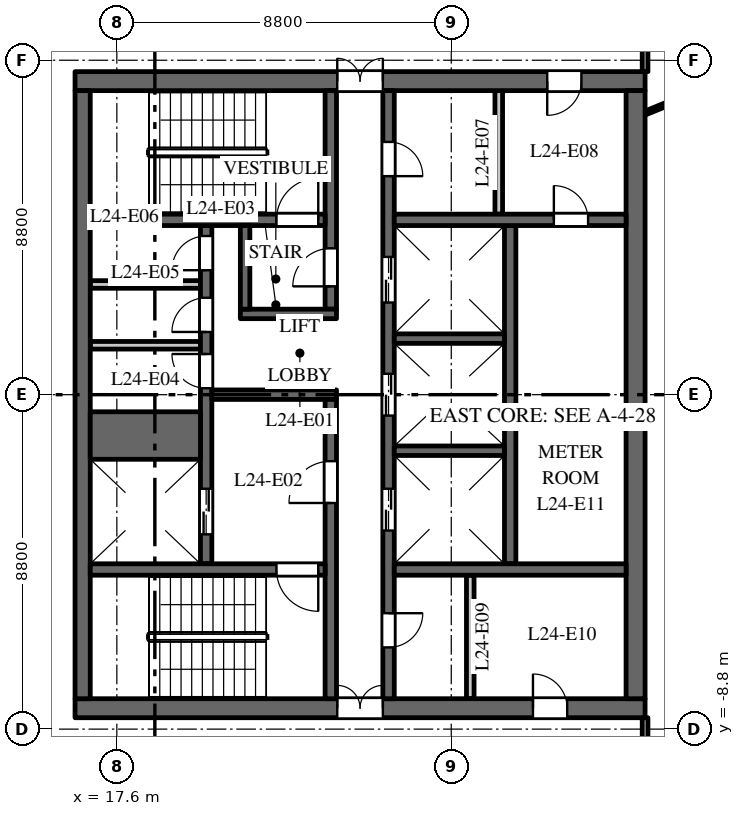
"""IFC4 building model, lengths in metres.
Left out: names, types, materials, properties, quantities, classifications, styles, units other than length and angle.
Written with IfcOpenShell. Run it as: python <this file> out.ifc"""

import sys

from ifc_helpers import new_model, si_unit, direction, frame, frame_2d, origin, place, context, subcontext, project, spatial, rectangle, extrude, element, fill, save


model = new_model("IFC4")
c1 = context("Model", 3, precision=1e-05, world=origin(), true_north=direction((0.0, 1.0)))
c2 = subcontext(c1, "Body", "Model", "MODEL_VIEW")
j1 = project(units=[si_unit("LENGTHUNIT", "METRE"), si_unit("PLANEANGLEUNIT", "RADIAN")], contexts=[c1])
p1 = place(None, origin())
s1 = spatial("IfcSite", under=j1, at=p1, CompositionType="ELEMENT")
p2 = place(p1, origin())
s2 = spatial("IfcBuilding", under=s1, at=p2, CompositionType="ELEMENT")
p3 = place(p2, frame((0.0, 0.0, 108.0)))
s3 = spatial("IfcBuildingStorey", under=s2, at=p3, CompositionType="ELEMENT", Elevation=108.0)
p4 = place(p3, frame((16.5, 8.25, 0.0), z_axis=(0.0, 0.0, 1.0), x_axis=(1.0, 0.0, 0.0)))
e1 = element("IfcWall", 1, at=p4, inside=s3, PredefinedType="SHEAR", context=c2, shape_type="SweptSolid", body=[
    extrude(rectangle(XDim=15.0, YDim=0.5, at=frame_2d((7.5, 0.0))), origin(), (0.0, 0.0, 1.0), 3.7),
])
p5 = place(p4, frame((6.9, 0.0, 0.0)))
e2 = element("IfcOpeningElement", 2, at=p5, cuts=e1, PredefinedType="OPENING", context=c2, shape_type="SweptSolid", body=[
    extrude(rectangle(XDim=1.2, YDim=2.1, at=frame_2d((0.6, 1.05))), frame((0.0, 0.26, 0.0), z_axis=(0.0, -1.0, 0.0), x_axis=(1.0, 0.0, 0.0)), (0.0, 0.0, 1.0), 0.52),
])
p6 = place(p4, frame((12.425, 0.0, 0.0)))
e3 = element("IfcOpeningElement", 3, at=p6, cuts=e1, PredefinedType="OPENING", context=c2, shape_type="SweptSolid", body=[
    extrude(rectangle(XDim=0.9, YDim=2.1, at=frame_2d((0.45, 1.05))), frame((0.0, 0.26, 0.0), z_axis=(0.0, -1.0, 0.0), x_axis=(1.0, 0.0, 0.0)), (0.0, 0.0, 1.0), 0.52),
])
p7 = place(p3, frame((16.5, -8.25, 0.0), z_axis=(0.0, 0.0, 1.0), x_axis=(1.0, 0.0, 0.0)))
e4 = element("IfcWall", 4, at=p7, inside=s3, PredefinedType="SHEAR", context=c2, shape_type="SweptSolid", body=[
    extrude(rectangle(XDim=15.0, YDim=0.5, at=frame_2d((7.5, 0.0))), origin(), (0.0, 0.0, 1.0), 3.7),
])
p8 = place(p7, frame((6.9, 0.0, 0.0)))
e5 = element("IfcOpeningElement", 5, at=p8, cuts=e4, PredefinedType="OPENING", context=c2, shape_type="SweptSolid", body=[
    extrude(rectangle(XDim=1.2, YDim=2.1, at=frame_2d((0.6, 1.05))), frame((0.0, 0.26, 0.0), z_axis=(0.0, -1.0, 0.0), x_axis=(1.0, 0.0, 0.0)), (0.0, 0.0, 1.0), 0.52),
])
p9 = place(p7, frame((12.05, 0.0, 0.0)))
e6 = element("IfcOpeningElement", 6, at=p9, cuts=e4, PredefinedType="OPENING", context=c2, shape_type="SweptSolid", body=[
    extrude(rectangle(XDim=0.9, YDim=2.1, at=frame_2d((0.45, 1.05))), frame((0.0, 0.26, 0.0), z_axis=(0.0, -1.0, 0.0), x_axis=(1.0, 0.0, 0.0)), (0.0, 0.0, 1.0), 0.52),
])
for number, where, z_axis, x_axis in (
    (7, (16.9, 1.3, 0.0), (0.0, 0.0, 1.0), (1.0, 0.0, 0.0)),
    (8, (16.9, 2.9, 0.0), (0.0, 0.0, 1.0), (1.0, 0.0, 0.0)),
):
    element("IfcWall", number, at=place(p3, frame(where, z_axis=z_axis, x_axis=x_axis)), inside=s3, PredefinedType="PARTITIONING", context=c2, shape_type="SweptSolid", body=[
        extrude(rectangle(XDim=2.9, YDim=0.2, at=frame_2d((1.45, 0.0))), origin(), (0.0, 0.0, 1.0), 3.7),
    ])
p10 = place(p3, frame((27.95, -4.45, 0.0), z_axis=(0.0, 0.0, 1.0), x_axis=(0.0, 1.0, 0.0)))
e9 = element("IfcWall", 9, at=p10, inside=s3, PredefinedType="SHEAR", context=c2, shape_type="SweptSolid", body=[
    extrude(rectangle(XDim=8.9, YDim=0.3, at=frame_2d((4.45, 0.0))), origin(), (0.0, 0.0, 1.0), 3.7),
])
p11 = place(p3, frame((19.95, -4.45, 0.0), z_axis=(0.0, 0.0, 1.0), x_axis=(0.0, 1.0, 0.0)))
e10 = element("IfcWall", 10, at=p11, inside=s3, PredefinedType="SHEAR", context=c2, shape_type="SweptSolid", body=[
    extrude(rectangle(XDim=8.9, YDim=0.3, at=frame_2d((4.45, 0.0))), origin(), (0.0, 0.0, 1.0), 3.7),
])
p12 = place(p11, frame((0.775, 0.0, 0.0)))
e11 = element("IfcOpeningElement", 11, at=p12, cuts=e10, PredefinedType="OPENING", context=c2, shape_type="SweptSolid", body=[
    extrude(rectangle(XDim=1.2, YDim=2.1, at=frame_2d((0.6, 1.05))), frame((0.0, 0.16, 0.0), z_axis=(0.0, -1.0, 0.0), x_axis=(1.0, 0.0, 0.0)), (0.0, 0.0, 1.0), 0.32),
])
p13 = place(p11, frame((4.62, 0.0, 0.0)))
e12 = element("IfcOpeningElement", 12, at=p13, cuts=e10, PredefinedType="OPENING", context=c2, shape_type="SweptSolid", body=[
    extrude(rectangle(XDim=0.9, YDim=2.1, at=frame_2d((0.45, 1.05))), frame((0.0, 0.16, 0.0), z_axis=(0.0, -1.0, 0.0), x_axis=(1.0, 0.0, 0.0)), (0.0, 0.0, 1.0), 0.32),
])
p14 = place(p11, frame((6.1, 0.0, 0.0)))
e13 = element("IfcOpeningElement", 13, at=p14, cuts=e10, PredefinedType="OPENING", context=c2, shape_type="SweptSolid", body=[
    extrude(rectangle(XDim=0.9, YDim=2.1, at=frame_2d((0.45, 1.05))), frame((0.0, 0.16, 0.0), z_axis=(0.0, -1.0, 0.0), x_axis=(1.0, 0.0, 0.0)), (0.0, 0.0, 1.0), 0.32),
])
p15 = place(p11, frame((7.725, 0.0, 0.0)))
e14 = element("IfcOpeningElement", 14, at=p15, cuts=e10, PredefinedType="OPENING", context=c2, shape_type="SweptSolid", body=[
    extrude(rectangle(XDim=0.9, YDim=2.1, at=frame_2d((0.45, 1.05))), frame((0.0, 0.16, 0.0), z_axis=(0.0, -1.0, 0.0), x_axis=(1.0, 0.0, 0.0)), (0.0, 0.0, 1.0), 0.32),
])
p16 = place(p3, frame((24.75, -8.0, 0.0), z_axis=(0.0, 0.0, 1.0), x_axis=(0.0, 1.0, 0.0)))
e15 = element("IfcWall", 15, at=p16, inside=s3, PredefinedType="SHEAR", context=c2, shape_type="SweptSolid", body=[
    extrude(rectangle(XDim=16.0, YDim=0.3, at=frame_2d((8.0, 0.0))), origin(), (0.0, 0.0, 1.0), 3.7),
])
p17 = place(p16, frame((4.425, 0.0, 0.0)))
e16 = element("IfcOpeningElement", 16, at=p17, cuts=e15, PredefinedType="OPENING", context=c2, shape_type="SweptSolid", body=[
    extrude(rectangle(XDim=1.1, YDim=2.1, at=frame_2d((0.55, 1.05))), frame((0.0, 0.16, 0.0), z_axis=(0.0, -1.0, 0.0), x_axis=(1.0, 0.0, 0.0)), (0.0, 0.0, 1.0), 0.32),
])
p18 = place(p16, frame((7.45, 0.0, 0.0)))
e17 = element("IfcOpeningElement", 17, at=p18, cuts=e15, PredefinedType="OPENING", context=c2, shape_type="SweptSolid", body=[
    extrude(rectangle(XDim=1.1, YDim=2.1, at=frame_2d((0.55, 1.05))), frame((0.0, 0.16, 0.0), z_axis=(0.0, -1.0, 0.0), x_axis=(1.0, 0.0, 0.0)), (0.0, 0.0, 1.0), 0.32),
])
p19 = place(p16, frame((10.425, 0.0, 0.0)))
e18 = element("IfcOpeningElement", 18, at=p19, cuts=e15, PredefinedType="OPENING", context=c2, shape_type="SweptSolid", body=[
    extrude(rectangle(XDim=1.2, YDim=2.1, at=frame_2d((0.6, 1.05))), frame((0.0, 0.16, 0.0), z_axis=(0.0, -1.0, 0.0), x_axis=(1.0, 0.0, 0.0)), (0.0, 0.0, 1.0), 0.32),
])
p20 = place(p16, frame((13.75, 0.0, 0.0)))
e19 = element("IfcOpeningElement", 19, at=p20, cuts=e15, PredefinedType="OPENING", context=c2, shape_type="SweptSolid", body=[
    extrude(rectangle(XDim=0.9, YDim=2.1, at=frame_2d((0.45, 1.05))), frame((0.0, 0.16, 0.0), z_axis=(0.0, -1.0, 0.0), x_axis=(1.0, 0.0, 0.0)), (0.0, 0.0, 1.0), 0.32),
])
p21 = place(p16, frame((1.35, 0.0, 0.0)))
e20 = element("IfcOpeningElement", 20, at=p21, cuts=e15, PredefinedType="OPENING", context=c2, shape_type="SweptSolid", body=[
    extrude(rectangle(XDim=0.9, YDim=2.1, at=frame_2d((0.45, 1.05))), frame((0.0, 0.16, 0.0), z_axis=(0.0, -1.0, 0.0), x_axis=(1.0, 0.0, 0.0)), (0.0, 0.0, 1.0), 0.32),
])
p22 = place(p3, frame((20.1, 0.0, 0.0), z_axis=(0.0, 0.0, 1.0), x_axis=(1.0, 0.0, 0.0)))
e21 = element("IfcWall", 21, at=p22, inside=s3, PredefinedType="SHEAR", context=c2, shape_type="SweptSolid", body=[
    extrude(rectangle(XDim=3.28, YDim=0.25, at=frame_2d((1.64, 0.0))), origin(), (0.0, 0.0, 1.0), 3.7),
])
p23 = place(p3, frame((16.7, -8.0, 0.0), z_axis=(0.0, 0.0, 1.0), x_axis=(0.0, 1.0, 0.0)))
e22 = element("IfcWall", 22, at=p23, inside=s3, PredefinedType="SHEAR", context=c2, shape_type="SweptSolid", body=[
    extrude(rectangle(XDim=16.0, YDim=0.4, at=frame_2d((8.0, 0.0))), origin(), (0.0, 0.0, 1.0), 3.7),
])
p24 = place(p3, frame((31.25, -8.0, 0.0), z_axis=(0.0, 0.0, 1.0), x_axis=(0.0, 1.0, 0.0)))
e23 = element("IfcWall", 23, at=p24, inside=s3, PredefinedType="SHEAR", context=c2, shape_type="SweptSolid", body=[
    extrude(rectangle(XDim=16.0, YDim=0.5, at=frame_2d((8.0, 0.0))), origin(), (0.0, 0.0, 1.0), 3.7),
])
p25 = place(p3, frame((24.9, 4.6, 0.0), z_axis=(0.0, 0.0, 1.0), x_axis=(1.0, 0.0, 0.0)))
e24 = element("IfcWall", 24, at=p25, inside=s3, PredefinedType="SHEAR", context=c2, shape_type="SweptSolid", body=[
    extrude(rectangle(XDim=6.1, YDim=0.3, at=frame_2d((3.05, 0.0))), origin(), (0.0, 0.0, 1.0), 3.7),
])
p26 = place(p25, frame((4.2, 0.0, 0.0)))
e25 = element("IfcOpeningElement", 25, at=p26, cuts=e24, PredefinedType="OPENING", context=c2, shape_type="SweptSolid", body=[
    extrude(rectangle(XDim=0.9, YDim=2.1, at=frame_2d((0.45, 1.05))), frame((0.0, 0.16, 0.0), z_axis=(0.0, -1.0, 0.0), x_axis=(1.0, 0.0, 0.0)), (0.0, 0.0, 1.0), 0.32),
])
for number, where, z_axis, x_axis in (
    (26, (27.65, 4.75, 0.0), (0.0, 0.0, 1.0), (0.0, 1.0, 0.0)),
    (27, (26.9, -8.0, 0.0), (0.0, 0.0, 1.0), (0.0, 1.0, 0.0)),
):
    element("IfcWall", number, at=place(p3, frame(where, z_axis=z_axis, x_axis=x_axis)), inside=s3, PredefinedType="PARTITIONING", context=c2, shape_type="SweptSolid", body=[
        extrude(rectangle(XDim=3.25, YDim=0.2, at=frame_2d((1.625, 0.0))), origin(), (0.0, 0.0, 1.0), 3.7),
    ])
p27 = place(p3, frame((24.9, -4.6, 0.0), z_axis=(0.0, 0.0, 1.0), x_axis=(1.0, 0.0, 0.0)))
e28 = element("IfcWall", 28, at=p27, inside=s3, PredefinedType="SHEAR", context=c2, shape_type="SweptSolid", body=[
    extrude(rectangle(XDim=6.1, YDim=0.3, at=frame_2d((3.05, 0.0))), origin(), (0.0, 0.0, 1.0), 3.7),
])
p28 = place(p3, frame((16.9, -1.075, 0.0), z_axis=(0.0, 0.0, 1.0), x_axis=(1.0, 0.0, 0.0)))
e29 = element("IfcWall", 29, at=p28, inside=s3, PredefinedType="SHEAR", context=c2, shape_type="SweptSolid", body=[
    extrude(rectangle(XDim=2.9, YDim=1.25, at=frame_2d((1.45, 0.0))), origin(), (0.0, 0.0, 1.0), 3.7),
])
for number, where, z_axis, x_axis in (
    (30, (24.9, -1.475, 0.0), (0.0, 0.0, 1.0), (1.0, 0.0, 0.0)),
    (31, (24.9, 1.475, 0.0), (0.0, 0.0, 1.0), (1.0, 0.0, 0.0)),
):
    element("IfcWall", number, at=place(p3, frame(where, z_axis=z_axis, x_axis=x_axis)), inside=s3, PredefinedType="SHEAR", context=c2, shape_type="SweptSolid", body=[
        extrude(rectangle(XDim=2.9, YDim=0.25, at=frame_2d((1.45, 0.0))), origin(), (0.0, 0.0, 1.0), 3.7),
    ])
p29 = place(p3, frame((23.23, 2.25, 0.0), z_axis=(0.0, 0.0, 1.0), x_axis=(0.0, 1.0, 0.0)))
e32 = element("IfcWall", 32, at=p29, inside=s3, PredefinedType="SHEAR", context=c2, shape_type="SweptSolid", body=[
    extrude(rectangle(XDim=5.75, YDim=0.3, at=frame_2d((2.875, 0.0))), origin(), (0.0, 0.0, 1.0), 3.7),
])
p30 = place(p29, frame((0.6, 0.0, 0.0)))
e33 = element("IfcOpeningElement", 33, at=p30, cuts=e32, PredefinedType="OPENING", context=c2, shape_type="SweptSolid", body=[
    extrude(rectangle(XDim=1.0, YDim=2.1, at=frame_2d((0.5, 1.05))), frame((0.0, 0.16, 0.0), z_axis=(0.0, -1.0, 0.0), x_axis=(1.0, 0.0, 0.0)), (0.0, 0.0, 1.0), 0.32),
])
p31 = place(p3, frame((23.23, -8.0, 0.0), z_axis=(0.0, 0.0, 1.0), x_axis=(0.0, 1.0, 0.0)))
e34 = element("IfcWall", 34, at=p31, inside=s3, PredefinedType="SHEAR", context=c2, shape_type="SweptSolid", body=[
    extrude(rectangle(XDim=7.875, YDim=0.3, at=frame_2d((3.938, 0.0))), origin(), (0.0, 0.0, 1.0), 3.7),
])
p32 = place(p31, frame((5.15, 0.0, 0.0)))
e35 = element("IfcOpeningElement", 35, at=p32, cuts=e34, PredefinedType="OPENING", context=c2, shape_type="SweptSolid", body=[
    extrude(rectangle(XDim=1.1, YDim=2.1, at=frame_2d((0.55, 1.05))), frame((0.0, 0.16, 0.0), z_axis=(0.0, -1.0, 0.0), x_axis=(1.0, 0.0, 0.0)), (0.0, 0.0, 1.0), 0.32),
])
p33 = place(p3, frame((16.9, 4.6, 0.0), z_axis=(0.0, 0.0, 1.0), x_axis=(1.0, 0.0, 0.0)))
e36 = element("IfcWall", 36, at=p33, inside=s3, PredefinedType="SHEAR", context=c2, shape_type="SweptSolid", body=[
    extrude(rectangle(XDim=6.18, YDim=0.3, at=frame_2d((3.09, 0.0))), origin(), (0.0, 0.0, 1.0), 3.7),
])
p34 = place(p33, frame((4.9, 0.0, 0.0)))
e37 = element("IfcOpeningElement", 37, at=p34, cuts=e36, PredefinedType="OPENING", context=c2, shape_type="SweptSolid", body=[
    extrude(rectangle(XDim=1.1, YDim=2.1, at=frame_2d((0.55, 1.05))), frame((0.0, 0.16, 0.0), z_axis=(0.0, -1.0, 0.0), x_axis=(1.0, 0.0, 0.0)), (0.0, 0.0, 1.0), 0.32),
])
p35 = place(p3, frame((16.9, -4.6, 0.0), z_axis=(0.0, 0.0, 1.0), x_axis=(1.0, 0.0, 0.0)))
e38 = element("IfcWall", 38, at=p35, inside=s3, PredefinedType="SHEAR", context=c2, shape_type="SweptSolid", body=[
    extrude(rectangle(XDim=6.18, YDim=0.3, at=frame_2d((3.09, 0.0))), origin(), (0.0, 0.0, 1.0), 3.7),
])
p36 = place(p35, frame((4.9, 0.0, 0.0)))
e39 = element("IfcOpeningElement", 39, at=p36, cuts=e38, PredefinedType="OPENING", context=c2, shape_type="SweptSolid", body=[
    extrude(rectangle(XDim=1.1, YDim=2.1, at=frame_2d((0.55, 1.05))), frame((0.0, 0.16, 0.0), z_axis=(0.0, -1.0, 0.0), x_axis=(1.0, 0.0, 0.0)), (0.0, 0.0, 1.0), 0.32),
])
p37 = place(p3, frame((20.85, 2.125, 0.0), z_axis=(0.0, 0.0, 1.0), x_axis=(1.0, 0.0, 0.0)))
e40 = element("IfcWall", 40, at=p37, inside=s3, PredefinedType="SHEAR", context=c2, shape_type="SweptSolid", body=[
    extrude(rectangle(XDim=2.53, YDim=0.25, at=frame_2d((1.265, 0.0))), origin(), (0.0, 0.0, 1.0), 3.7),
])
p38 = place(p3, frame((20.975, 2.25, 0.0), z_axis=(0.0, 0.0, 1.0), x_axis=(0.0, 1.0, 0.0)))
e41 = element("IfcWall", 41, at=p38, inside=s3, PredefinedType="SHEAR", context=c2, shape_type="SweptSolid", body=[
    extrude(rectangle(XDim=2.2, YDim=0.25, at=frame_2d((1.1, 0.0))), origin(), (0.0, 0.0, 1.0), 3.7),
])
p39 = place(p3, frame((31.5, -10.7, 0.0), z_axis=(0.0, 0.0, 1.0), x_axis=(0.0, 1.0, 0.0)))
e42 = element("IfcWall", 42, at=p39, inside=s3, PredefinedType="PARTITIONING", context=c2, shape_type="SweptSolid", body=[
    extrude(rectangle(XDim=2.2, YDim=0.15, at=frame_2d((1.1, 0.0))), origin(), (0.0, 0.0, 1.0), 2.9),
])
p40 = place(p3, frame((31.5, 7.41, 0.0), z_axis=(0.0, 0.0, 1.0), x_axis=(0.925344112436, 0.379128307542, 0.0)))
e43 = element("IfcWall", 43, at=p40, inside=s3, PredefinedType="PARTITIONING", context=c2, shape_type="SweptSolid", body=[
    extrude(rectangle(XDim=2.954, YDim=0.1, at=frame_2d((1.477, 0.0))), origin(), (0.0, 0.0, 1.0), 3.7),
])
p41 = place(p3, frame((31.5, 8.5, 0.0), z_axis=(0.0, 0.0, 1.0), x_axis=(0.0, 1.0, 0.0)))
e44 = element("IfcWall", 44, at=p41, inside=s3, PredefinedType="PARTITIONING", context=c2, shape_type="SweptSolid", body=[
    extrude(rectangle(XDim=2.2, YDim=0.15, at=frame_2d((1.1, 0.0))), origin(), (0.0, 0.0, 1.0), 2.9),
])
p42 = place(p12, origin())
e45 = element("IfcDoor", 45, at=p42, inside=s3, OperationType="DOUBLE_DOOR_SLIDING", PredefinedType="DOOR", context=c2, shape_type="SweptSolid", body=[
    extrude(rectangle(XDim=1.2, YDim=2.1, at=frame_2d((0.6, 1.05))), frame((0.0, 0.025, 0.0), z_axis=(0.0, -1.0, 0.0), x_axis=(1.0, 0.0, 0.0)), (0.0, 0.0, 1.0), 0.05),
])
fill(e11, e45)
p43 = place(p17, origin())
e46 = element("IfcDoor", 46, at=p43, inside=s3, OperationType="DOUBLE_DOOR_SLIDING", PredefinedType="DOOR", context=c2, shape_type="SweptSolid", body=[
    extrude(rectangle(XDim=1.1, YDim=2.1, at=frame_2d((0.55, 1.05))), frame((0.0, 0.025, 0.0), z_axis=(0.0, -1.0, 0.0), x_axis=(1.0, 0.0, 0.0)), (0.0, 0.0, 1.0), 0.05),
])
fill(e16, e46)
p44 = place(p18, origin())
e47 = element("IfcDoor", 47, at=p44, inside=s3, OperationType="DOUBLE_DOOR_SLIDING", PredefinedType="DOOR", context=c2, shape_type="SweptSolid", body=[
    extrude(rectangle(XDim=1.1, YDim=2.1, at=frame_2d((0.55, 1.05))), frame((0.0, 0.025, 0.0), z_axis=(0.0, -1.0, 0.0), x_axis=(1.0, 0.0, 0.0)), (0.0, 0.0, 1.0), 0.05),
])
fill(e17, e47)
p45 = place(p19, origin())
e48 = element("IfcDoor", 48, at=p45, inside=s3, OperationType="DOUBLE_DOOR_SLIDING", PredefinedType="DOOR", context=c2, shape_type="SweptSolid", body=[
    extrude(rectangle(XDim=1.2, YDim=2.1, at=frame_2d((0.6, 1.05))), frame((0.0, 0.025, 0.0), z_axis=(0.0, -1.0, 0.0), x_axis=(1.0, 0.0, 0.0)), (0.0, 0.0, 1.0), 0.05),
])
fill(e18, e48)
p46 = place(p34, origin())
e49 = element("IfcDoor", 49, at=p46, inside=s3, OperationType="SINGLE_SWING_LEFT", PredefinedType="DOOR", context=c2, shape_type="SweptSolid", body=[
    extrude(rectangle(XDim=1.1, YDim=2.1, at=frame_2d((0.55, 1.05))), frame((0.0, 0.025, 0.0), z_axis=(0.0, -1.0, 0.0), x_axis=(1.0, 0.0, 0.0)), (0.0, 0.0, 1.0), 0.05),
])
fill(e37, e49)
p47 = place(p36, origin())
e50 = element("IfcDoor", 50, at=p47, inside=s3, OperationType="SINGLE_SWING_RIGHT", PredefinedType="DOOR", context=c2, shape_type="SweptSolid", body=[
    extrude(rectangle(XDim=1.1, YDim=2.1, at=frame_2d((0.55, 1.05))), frame((0.0, 0.025, 0.0), z_axis=(0.0, -1.0, 0.0), x_axis=(1.0, 0.0, 0.0)), (0.0, 0.0, 1.0), 0.05),
])
fill(e39, e50)
p48 = place(p32, origin())
e51 = element("IfcDoor", 51, at=p48, inside=s3, OperationType="SINGLE_SWING_RIGHT", PredefinedType="DOOR", context=c2, shape_type="SweptSolid", body=[
    extrude(rectangle(XDim=1.1, YDim=2.1, at=frame_2d((0.55, 1.05))), frame((0.0, 0.025, 0.0), z_axis=(0.0, -1.0, 0.0), x_axis=(1.0, 0.0, 0.0)), (0.0, 0.0, 1.0), 0.05),
])
fill(e35, e51)
p49 = place(p30, origin())
e52 = element("IfcDoor", 52, at=p49, inside=s3, OperationType="SINGLE_SWING_RIGHT", PredefinedType="DOOR", context=c2, shape_type="SweptSolid", body=[
    extrude(rectangle(XDim=1.0, YDim=2.1, at=frame_2d((0.5, 1.05))), frame((0.0, 0.025, 0.0), z_axis=(0.0, -1.0, 0.0), x_axis=(1.0, 0.0, 0.0)), (0.0, 0.0, 1.0), 0.05),
])
fill(e33, e52)
p50 = place(p5, origin())
e53 = element("IfcDoor", 53, at=p50, inside=s3, OperationType="DOUBLE_DOOR_DOUBLE_SWING", PredefinedType="DOOR", context=c2, shape_type="SweptSolid", body=[
    extrude(rectangle(XDim=1.2, YDim=2.1, at=frame_2d((0.6, 1.05))), frame((0.0, 0.025, 0.0), z_axis=(0.0, -1.0, 0.0), x_axis=(1.0, 0.0, 0.0)), (0.0, 0.0, 1.0), 0.05),
])
fill(e2, e53)
p51 = place(p8, origin())
e54 = element("IfcDoor", 54, at=p51, inside=s3, OperationType="DOUBLE_DOOR_DOUBLE_SWING", PredefinedType="DOOR", context=c2, shape_type="SweptSolid", body=[
    extrude(rectangle(XDim=1.2, YDim=2.1, at=frame_2d((0.6, 1.05))), frame((0.0, 0.025, 0.0), z_axis=(0.0, -1.0, 0.0), x_axis=(1.0, 0.0, 0.0)), (0.0, 0.0, 1.0), 0.05),
])
fill(e5, e54)
p52 = place(p13, origin())
e55 = element("IfcDoor", 55, at=p52, inside=s3, OperationType="SINGLE_SWING_LEFT", PredefinedType="DOOR", context=c2, shape_type="SweptSolid", body=[
    extrude(rectangle(XDim=0.9, YDim=2.1, at=frame_2d((0.45, 1.05))), frame((0.0, 0.025, 0.0), z_axis=(0.0, -1.0, 0.0), x_axis=(1.0, 0.0, 0.0)), (0.0, 0.0, 1.0), 0.05),
])
fill(e12, e55)
p53 = place(p14, origin())
e56 = element("IfcDoor", 56, at=p53, inside=s3, OperationType="SINGLE_SWING_RIGHT", PredefinedType="DOOR", context=c2, shape_type="SweptSolid", body=[
    extrude(rectangle(XDim=0.9, YDim=2.1, at=frame_2d((0.45, 1.05))), frame((0.0, 0.025, 0.0), z_axis=(0.0, -1.0, 0.0), x_axis=(1.0, 0.0, 0.0)), (0.0, 0.0, 1.0), 0.05),
])
fill(e13, e56)
p54 = place(p15, origin())
e57 = element("IfcDoor", 57, at=p54, inside=s3, OperationType="SINGLE_SWING_RIGHT", PredefinedType="DOOR", context=c2, shape_type="SweptSolid", body=[
    extrude(rectangle(XDim=0.9, YDim=2.1, at=frame_2d((0.45, 1.05))), frame((0.0, 0.025, 0.0), z_axis=(0.0, -1.0, 0.0), x_axis=(1.0, 0.0, 0.0)), (0.0, 0.0, 1.0), 0.05),
])
fill(e14, e57)
p55 = place(p20, origin())
e58 = element("IfcDoor", 58, at=p55, inside=s3, OperationType="SINGLE_SWING_LEFT", PredefinedType="DOOR", context=c2, shape_type="SweptSolid", body=[
    extrude(rectangle(XDim=0.9, YDim=2.1, at=frame_2d((0.45, 1.05))), frame((0.0, 0.025, 0.0), z_axis=(0.0, -1.0, 0.0), x_axis=(1.0, 0.0, 0.0)), (0.0, 0.0, 1.0), 0.05),
])
fill(e19, e58)
p56 = place(p6, origin())
e59 = element("IfcDoor", 59, at=p56, inside=s3, OperationType="SINGLE_SWING_LEFT", PredefinedType="DOOR", context=c2, shape_type="SweptSolid", body=[
    extrude(rectangle(XDim=0.9, YDim=2.1, at=frame_2d((0.45, 1.05))), frame((0.0, 0.025, 0.0), z_axis=(0.0, -1.0, 0.0), x_axis=(1.0, 0.0, 0.0)), (0.0, 0.0, 1.0), 0.05),
])
fill(e3, e59)
p57 = place(p21, origin())
e60 = element("IfcDoor", 60, at=p57, inside=s3, OperationType="SINGLE_SWING_RIGHT", PredefinedType="DOOR", context=c2, shape_type="SweptSolid", body=[
    extrude(rectangle(XDim=0.9, YDim=2.1, at=frame_2d((0.45, 1.05))), frame((0.0, 0.025, 0.0), z_axis=(0.0, -1.0, 0.0), x_axis=(1.0, 0.0, 0.0)), (0.0, 0.0, 1.0), 0.05),
])
fill(e20, e60)
p58 = place(p9, origin())
e61 = element("IfcDoor", 61, at=p58, inside=s3, OperationType="SINGLE_SWING_RIGHT", PredefinedType="DOOR", context=c2, shape_type="SweptSolid", body=[
    extrude(rectangle(XDim=0.9, YDim=2.1, at=frame_2d((0.45, 1.05))), frame((0.0, 0.025, 0.0), z_axis=(0.0, -1.0, 0.0), x_axis=(1.0, 0.0, 0.0)), (0.0, 0.0, 1.0), 0.05),
])
fill(e6, e61)
p59 = place(p26, origin())
e62 = element("IfcDoor", 62, at=p59, inside=s3, OperationType="SINGLE_SWING_RIGHT", PredefinedType="DOOR", context=c2, shape_type="SweptSolid", body=[
    extrude(rectangle(XDim=0.9, YDim=2.1, at=frame_2d((0.45, 1.05))), frame((0.0, 0.025, 0.0), z_axis=(0.0, -1.0, 0.0), x_axis=(1.0, 0.0, 0.0)), (0.0, 0.0, 1.0), 0.05),
])
fill(e25, e62)
save(model, sys.argv[1])
